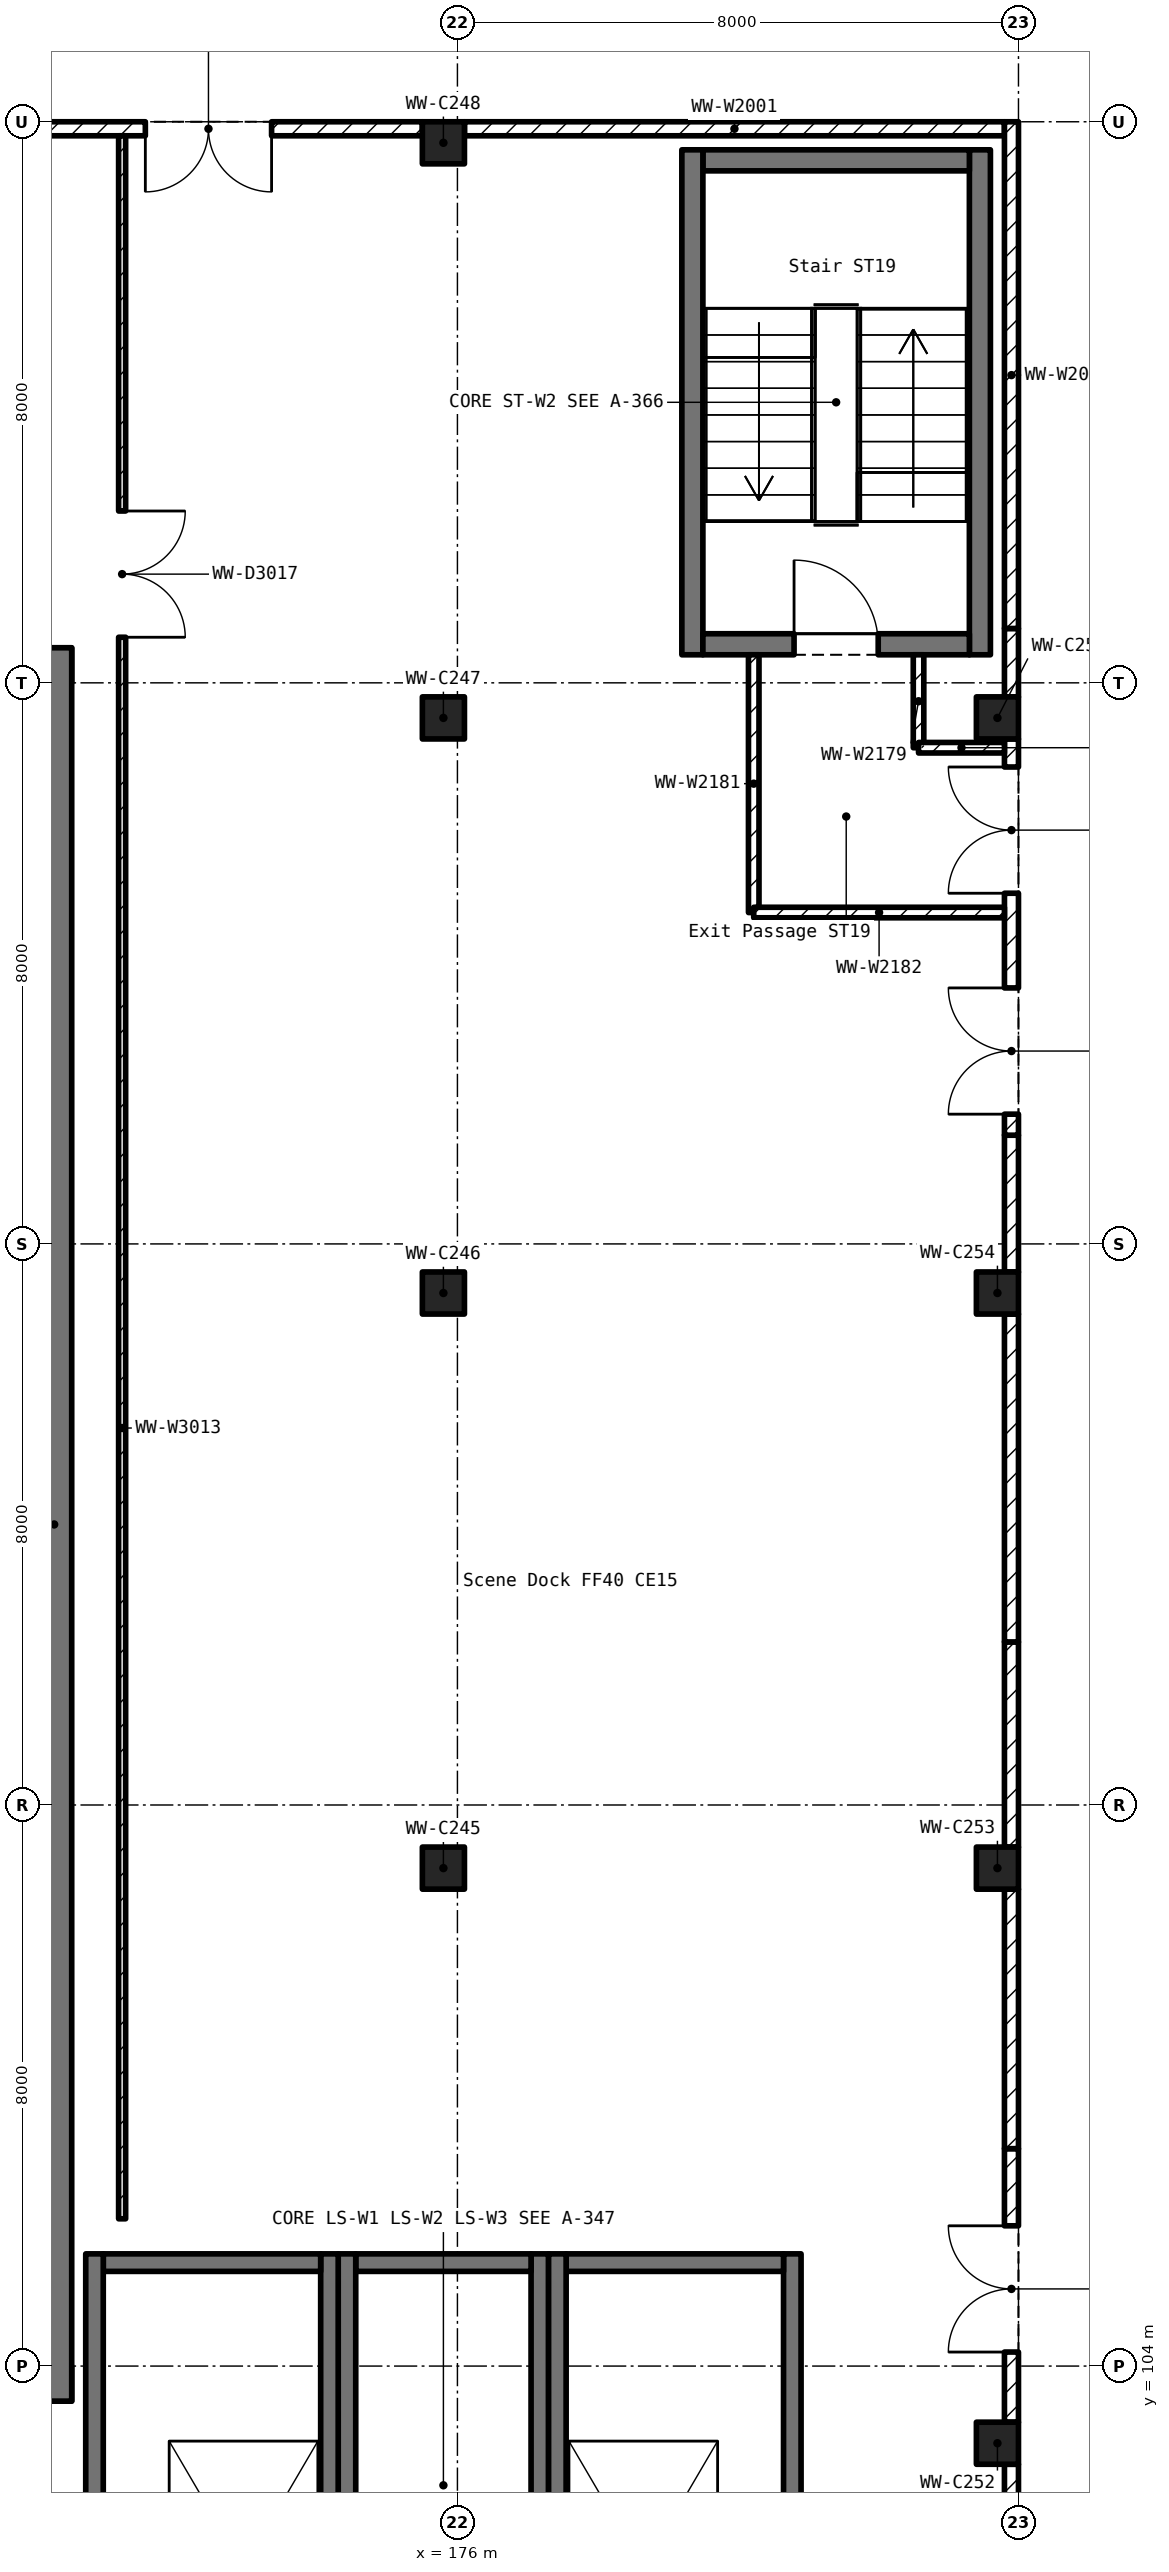
"""IFC4 building model, lengths in metres.
Left out: names, types, materials, properties, quantities, classifications, styles, units other than length and angle.
Written with IfcOpenShell. Run it as: python <this file> out.ifc"""

import sys

from ifc_helpers import new_model, si_unit, direction, frame, frame_2d, origin, origin_2d, place, context, subcontext, project, spatial, rectangle, extrude, element, fill, save


model = new_model("IFC4")
c1 = context("Model", 3, precision=1e-05, world=origin(), true_north=direction((0.0, 1.0)))
c2 = subcontext(c1, "Body", "Model", "MODEL_VIEW")
j1 = project(units=[si_unit("LENGTHUNIT", "METRE"), si_unit("PLANEANGLEUNIT", "RADIAN")], contexts=[c1])
p1 = place(None, origin())
s1 = spatial("IfcSite", under=j1, at=p1, CompositionType="ELEMENT")
p2 = place(p1, origin())
s2 = spatial("IfcBuilding", under=s1, at=p2, CompositionType="ELEMENT")
p3 = place(p2, origin())
s3 = spatial("IfcBuildingStorey", under=s2, at=p3, CompositionType="ELEMENT", Elevation=0.0)
for number, where, z_axis, x_axis in (
    (1, (175.8, 111.1, 0.0), (0.0, 0.0, 1.0), (1.0, 0.0, 0.0)),
    (2, (175.8, 119.3, 0.0), (0.0, 0.0, 1.0), (1.0, 0.0, 0.0)),
    (3, (175.8, 127.5, 0.0), (0.0, 0.0, 1.0), (1.0, 0.0, 0.0)),
    (4, (175.8, 135.7, 0.0), (0.0, 0.0, 1.0), (1.0, 0.0, 0.0)),
    (5, (183.7, 102.9, 0.0), (0.0, 0.0, 1.0), (1.0, 0.0, 0.0)),
    (6, (183.7, 111.1, 0.0), (0.0, 0.0, 1.0), (1.0, 0.0, 0.0)),
    (7, (183.7, 119.3, 0.0), (0.0, 0.0, 1.0), (1.0, 0.0, 0.0)),
    (8, (183.7, 127.5, 0.0), (0.0, 0.0, 1.0), (1.0, 0.0, 0.0)),
):
    element("IfcColumn", number, at=place(p3, frame(where, z_axis=z_axis, x_axis=x_axis)), inside=s3, PredefinedType="COLUMN", context=c2, shape_type="SweptSolid", body=[
        extrude(rectangle(XDim=0.6, YDim=0.6, at=origin_2d()), origin(), (0.0, 0.0, 1.0), 6.0),
    ])
p4 = place(p3, frame((143.5, 103.75, 0.0), z_axis=(0.0, 0.0, 1.0), x_axis=(1.0, 0.0, 0.0)))
e9 = element("IfcWall", 9, at=p4, inside=s3, PredefinedType="SHEAR", context=c2, shape_type="SweptSolid", body=[
    extrude(rectangle(XDim=27.0, YDim=0.5, at=frame_2d((13.5, 0.0))), origin(), (0.0, 0.0, 1.0), 6.0),
])
p5 = place(p3, frame((143.5, 128.25, 0.0), z_axis=(0.0, 0.0, 1.0), x_axis=(1.0, 0.0, 0.0)))
e10 = element("IfcWall", 10, at=p5, inside=s3, PredefinedType="SHEAR", context=c2, shape_type="SweptSolid", body=[
    extrude(rectangle(XDim=27.0, YDim=0.5, at=frame_2d((13.5, 0.0))), origin(), (0.0, 0.0, 1.0), 6.0),
])
p6 = place(p5, frame((14.0, 0.0, 0.0)))
e11 = element("IfcOpeningElement", 11, at=p6, cuts=e10, PredefinedType="OPENING", context=c2, shape_type="SweptSolid", body=[
    extrude(rectangle(XDim=1.8, YDim=2.1, at=frame_2d((0.9, 1.05))), frame((0.0, 0.262, 0.0), z_axis=(0.0, -1.0, 0.0), x_axis=(1.0, 0.0, 0.0)), (0.0, 0.0, 1.0), 0.524),
])
p7 = place(p5, frame((11.75, 0.0, 0.0)))
e12 = element("IfcOpeningElement", 12, at=p7, cuts=e10, PredefinedType="OPENING", context=c2, shape_type="SweptSolid", body=[
    extrude(rectangle(XDim=1.8, YDim=2.1, at=frame_2d((0.9, 1.05))), frame((0.0, 0.262, 0.0), z_axis=(0.0, -1.0, 0.0), x_axis=(1.0, 0.0, 0.0)), (0.0, 0.0, 1.0), 0.524),
])
p8 = place(p3, frame((170.25, 103.5, 0.0), z_axis=(0.0, 0.0, 1.0), x_axis=(0.0, 1.0, 0.0)))
e13 = element("IfcWall", 13, at=p8, inside=s3, PredefinedType="SHEAR", context=c2, shape_type="SweptSolid", body=[
    extrude(rectangle(XDim=25.0, YDim=0.5, at=frame_2d((12.5, 0.0))), origin(), (0.0, 0.0, 1.0), 6.0),
])
p9 = place(p3, frame((183.8, 135.9, 0.0), z_axis=(0.0, 0.0, 1.0), x_axis=(-1.0, 0.0, 0.0)))
e14 = element("IfcWall", 14, at=p9, inside=s3, PredefinedType="SOLIDWALL", context=c2, shape_type="SweptSolid", body=[
    extrude(rectangle(XDim=7.7, YDim=0.2, at=frame_2d((3.85, 0.0))), origin(), (0.0, 0.0, 1.0), 5.05),
])
p10 = place(p3, frame((175.5, 135.9, 0.0), z_axis=(0.0, 0.0, 1.0), x_axis=(-1.0, 0.0, 0.0)))
e15 = element("IfcWall", 15, at=p10, inside=s3, PredefinedType="SOLIDWALL", context=c2, shape_type="SweptSolid", body=[
    extrude(rectangle(XDim=7.3, YDim=0.2, at=frame_2d((3.65, 0.0))), origin(), (0.0, 0.0, 1.0), 5.05),
])
p11 = place(p10, frame((2.15, 0.0, 0.0)))
e16 = element("IfcOpeningElement", 16, at=p11, cuts=e15, PredefinedType="OPENING", context=c2, shape_type="SweptSolid", body=[
    extrude(rectangle(XDim=1.8, YDim=2.4, at=frame_2d((0.9, 1.2))), frame((0.0, 0.112, 0.0), z_axis=(0.0, -1.0, 0.0), x_axis=(1.0, 0.0, 0.0)), (0.0, 0.0, 1.0), 0.224),
])
p12 = place(p3, frame((183.9, 99.875, 0.0), z_axis=(0.0, 0.0, 1.0), x_axis=(0.0, 1.0, 0.0)))
e17 = element("IfcWall", 17, at=p12, inside=s3, PredefinedType="SOLIDWALL", context=c2, shape_type="SweptSolid", body=[
    extrude(rectangle(XDim=2.725, YDim=0.2, at=frame_2d((1.363, 0.0))), origin(), (0.0, 0.0, 1.0), 5.05),
])
p13 = place(p3, frame((183.9, 103.2, 0.0), z_axis=(0.0, 0.0, 1.0), x_axis=(0.0, 1.0, 0.0)))
e18 = element("IfcWall", 18, at=p13, inside=s3, PredefinedType="SOLIDWALL", context=c2, shape_type="SweptSolid", body=[
    extrude(rectangle(XDim=3.9, YDim=0.2, at=frame_2d((1.95, 0.0))), origin(), (0.0, 0.0, 1.0), 5.05),
])
p14 = place(p13, frame((1.0, 0.0, 0.0)))
e19 = element("IfcOpeningElement", 19, at=p14, cuts=e18, PredefinedType="OPENING", context=c2, shape_type="SweptSolid", body=[
    extrude(rectangle(XDim=1.8, YDim=2.4, at=frame_2d((0.9, 1.2))), frame((0.0, 0.112, 0.0), z_axis=(0.0, -1.0, 0.0), x_axis=(1.0, 0.0, 0.0)), (0.0, 0.0, 1.0), 0.224),
])
p15 = place(p3, frame((183.9, 107.1, 0.0), z_axis=(0.0, 0.0, 1.0), x_axis=(0.0, 1.0, 0.0)))
e20 = element("IfcWall", 20, at=p15, inside=s3, PredefinedType="SOLIDWALL", context=c2, shape_type="SweptSolid", body=[
    extrude(rectangle(XDim=3.7, YDim=0.2, at=frame_2d((1.85, 0.0))), origin(), (0.0, 0.0, 1.0), 5.05),
])
p16 = place(p3, frame((183.9, 111.4, 0.0), z_axis=(0.0, 0.0, 1.0), x_axis=(0.0, 1.0, 0.0)))
e21 = element("IfcWall", 21, at=p16, inside=s3, PredefinedType="SOLIDWALL", context=c2, shape_type="SweptSolid", body=[
    extrude(rectangle(XDim=2.925, YDim=0.2, at=frame_2d((1.462, 0.0))), origin(), (0.0, 0.0, 1.0), 5.05),
])
p17 = place(p3, frame((183.9, 114.325, 0.0), z_axis=(0.0, 0.0, 1.0), x_axis=(0.0, 1.0, 0.0)))
e22 = element("IfcWall", 22, at=p17, inside=s3, PredefinedType="SOLIDWALL", context=c2, shape_type="SweptSolid", body=[
    extrude(rectangle(XDim=4.675, YDim=0.2, at=frame_2d((2.337, 0.0))), origin(), (0.0, 0.0, 1.0), 5.05),
])
p18 = place(p3, frame((183.9, 119.6, 0.0), z_axis=(0.0, 0.0, 1.0), x_axis=(0.0, 1.0, 0.0)))
e23 = element("IfcWall", 23, at=p18, inside=s3, PredefinedType="SOLIDWALL", context=c2, shape_type="SweptSolid", body=[
    extrude(rectangle(XDim=1.95, YDim=0.2, at=frame_2d((0.975, 0.0))), origin(), (0.0, 0.0, 1.0), 5.05),
])
p19 = place(p3, frame((183.9, 121.55, 0.0), z_axis=(0.0, 0.0, 1.0), x_axis=(0.0, 1.0, 0.0)))
e24 = element("IfcWall", 24, at=p19, inside=s3, PredefinedType="SOLIDWALL", context=c2, shape_type="SweptSolid", body=[
    extrude(rectangle(XDim=5.65, YDim=0.2, at=frame_2d((2.825, 0.0))), origin(), (0.0, 0.0, 1.0), 5.05),
])
p20 = place(p19, frame((0.3, 0.0, 0.0)))
e25 = element("IfcOpeningElement", 25, at=p20, cuts=e24, PredefinedType="OPENING", context=c2, shape_type="SweptSolid", body=[
    extrude(rectangle(XDim=1.8, YDim=2.4, at=frame_2d((0.9, 1.2))), frame((0.0, 0.112, 0.0), z_axis=(0.0, -1.0, 0.0), x_axis=(1.0, 0.0, 0.0)), (0.0, 0.0, 1.0), 0.224),
])
p21 = place(p19, frame((3.45, 0.0, 0.0)))
e26 = element("IfcOpeningElement", 26, at=p21, cuts=e24, PredefinedType="OPENING", context=c2, shape_type="SweptSolid", body=[
    extrude(rectangle(XDim=1.8, YDim=2.4, at=frame_2d((0.9, 1.2))), frame((0.0, 0.112, 0.0), z_axis=(0.0, -1.0, 0.0), x_axis=(1.0, 0.0, 0.0)), (0.0, 0.0, 1.0), 0.224),
])
p22 = place(p3, frame((183.9, 127.8, 0.0), z_axis=(0.0, 0.0, 1.0), x_axis=(0.0, 1.0, 0.0)))
e27 = element("IfcWall", 27, at=p22, inside=s3, PredefinedType="SOLIDWALL", context=c2, shape_type="SweptSolid", body=[
    extrude(rectangle(XDim=0.975, YDim=0.2, at=frame_2d((0.487, 0.0))), origin(), (0.0, 0.0, 1.0), 5.05),
])
p23 = place(p3, frame((183.9, 128.775, 0.0), z_axis=(0.0, 0.0, 1.0), x_axis=(0.0, 1.0, 0.0)))
e28 = element("IfcWall", 28, at=p23, inside=s3, PredefinedType="SOLIDWALL", context=c2, shape_type="SweptSolid", body=[
    extrude(rectangle(XDim=7.225, YDim=0.2, at=frame_2d((3.613, 0.0))), origin(), (0.0, 0.0, 1.0), 5.05),
])
p24 = place(p3, frame((183.45, 128.4, 0.0), z_axis=(0.0, 0.0, 1.0), x_axis=(0.0, 1.0, 0.0)))
e29 = element("IfcWall", 29, at=p24, inside=s3, PredefinedType="SOLIDWALL", context=c2, shape_type="SweptSolid", body=[
    extrude(rectangle(XDim=7.2, YDim=0.3, at=frame_2d((3.6, 0.0))), origin(), (0.0, 0.0, 1.0), 6.0),
])
p25 = place(p3, frame((183.3, 135.45, 0.0), z_axis=(0.0, 0.0, 1.0), x_axis=(-1.0, 0.0, 0.0)))
e30 = element("IfcWall", 30, at=p25, inside=s3, PredefinedType="SOLIDWALL", context=c2, shape_type="SweptSolid", body=[
    extrude(rectangle(XDim=3.8, YDim=0.3, at=frame_2d((1.9, 0.0))), origin(), (0.0, 0.0, 1.0), 6.0),
])
p26 = place(p3, frame((179.35, 135.6, 0.0), z_axis=(0.0, 0.0, 1.0), x_axis=(0.0, -1.0, 0.0)))
e31 = element("IfcWall", 31, at=p26, inside=s3, PredefinedType="SOLIDWALL", context=c2, shape_type="SweptSolid", body=[
    extrude(rectangle(XDim=7.2, YDim=0.3, at=frame_2d((3.6, 0.0))), origin(), (0.0, 0.0, 1.0), 6.0),
])
p27 = place(p3, frame((179.5, 128.55, 0.0), z_axis=(0.0, 0.0, 1.0), x_axis=(1.0, 0.0, 0.0)))
e32 = element("IfcWall", 32, at=p27, inside=s3, PredefinedType="SOLIDWALL", context=c2, shape_type="SweptSolid", body=[
    extrude(rectangle(XDim=3.8, YDim=0.3, at=frame_2d((1.9, 0.0))), origin(), (0.0, 0.0, 1.0), 6.0),
])
p28 = place(p27, frame((1.3, 0.0, 0.0)))
e33 = element("IfcOpeningElement", 33, at=p28, cuts=e32, PredefinedType="OPENING", context=c2, shape_type="SweptSolid", body=[
    extrude(rectangle(XDim=1.2, YDim=2.1, at=frame_2d((0.6, 1.05))), frame((0.0, 0.162, 0.0), z_axis=(0.0, -1.0, 0.0), x_axis=(1.0, 0.0, 0.0)), (0.0, 0.0, 1.0), 0.324),
])
p29 = place(p3, frame((177.175, 99.0, 0.0), z_axis=(0.0, 0.0, 1.0), x_axis=(0.0, 1.0, 0.0)))
e34 = element("IfcWall", 34, at=p29, inside=s3, PredefinedType="SOLIDWALL", context=c2, shape_type="SweptSolid", body=[
    extrude(rectangle(XDim=6.6, YDim=0.25, at=frame_2d((3.3, 0.0))), origin(), (0.0, 0.0, 1.0), 6.0),
])
p30 = place(p3, frame((177.05, 105.475, 0.0), z_axis=(0.0, 0.0, 1.0), x_axis=(-1.0, 0.0, 0.0)))
e35 = element("IfcWall", 35, at=p30, inside=s3, PredefinedType="SOLIDWALL", context=c2, shape_type="SweptSolid", body=[
    extrude(rectangle(XDim=2.5, YDim=0.25, at=frame_2d((1.25, 0.0))), origin(), (0.0, 0.0, 1.0), 6.0),
])
for number, where, z_axis, x_axis in (
    (36, (174.425, 105.6, 0.0), (0.0, 0.0, 1.0), (0.0, -1.0, 0.0)),
    (37, (174.175, 99.0, 0.0), (0.0, 0.0, 1.0), (0.0, 1.0, 0.0)),
):
    element("IfcWall", number, at=place(p3, frame(where, z_axis=z_axis, x_axis=x_axis)), inside=s3, PredefinedType="SOLIDWALL", context=c2, shape_type="SweptSolid", body=[
        extrude(rectangle(XDim=6.6, YDim=0.25, at=frame_2d((3.3, 0.0))), origin(), (0.0, 0.0, 1.0), 6.0),
    ])
p31 = place(p3, frame((174.05, 105.475, 0.0), z_axis=(0.0, 0.0, 1.0), x_axis=(-1.0, 0.0, 0.0)))
e38 = element("IfcWall", 38, at=p31, inside=s3, PredefinedType="SOLIDWALL", context=c2, shape_type="SweptSolid", body=[
    extrude(rectangle(XDim=3.1, YDim=0.25, at=frame_2d((1.55, 0.0))), origin(), (0.0, 0.0, 1.0), 6.0),
])
for number, where, z_axis, x_axis in (
    (39, (170.825, 105.6, 0.0), (0.0, 0.0, 1.0), (0.0, -1.0, 0.0)),
    (40, (180.775, 99.0, 0.0), (0.0, 0.0, 1.0), (0.0, 1.0, 0.0)),
):
    element("IfcWall", number, at=place(p3, frame(where, z_axis=z_axis, x_axis=x_axis)), inside=s3, PredefinedType="SOLIDWALL", context=c2, shape_type="SweptSolid", body=[
        extrude(rectangle(XDim=6.6, YDim=0.25, at=frame_2d((3.3, 0.0))), origin(), (0.0, 0.0, 1.0), 6.0),
    ])
p32 = place(p3, frame((180.65, 105.475, 0.0), z_axis=(0.0, 0.0, 1.0), x_axis=(-1.0, 0.0, 0.0)))
e41 = element("IfcWall", 41, at=p32, inside=s3, PredefinedType="SOLIDWALL", context=c2, shape_type="SweptSolid", body=[
    extrude(rectangle(XDim=3.1, YDim=0.25, at=frame_2d((1.55, 0.0))), origin(), (0.0, 0.0, 1.0), 6.0),
])
p33 = place(p3, frame((177.425, 105.6, 0.0), z_axis=(0.0, 0.0, 1.0), x_axis=(0.0, -1.0, 0.0)))
e42 = element("IfcWall", 42, at=p33, inside=s3, PredefinedType="SOLIDWALL", context=c2, shape_type="SweptSolid", body=[
    extrude(rectangle(XDim=6.6, YDim=0.25, at=frame_2d((3.3, 0.0))), origin(), (0.0, 0.0, 1.0), 6.0),
])
p34 = place(p3, frame((171.219, 135.8, 0.0), z_axis=(0.0, 0.0, 1.0), x_axis=(0.0, -1.0, 0.0)))
e43 = element("IfcWall", 43, at=p34, inside=s3, PredefinedType="PARTITIONING", context=c2, shape_type="SweptSolid", body=[
    extrude(rectangle(XDim=29.7, YDim=0.1, at=frame_2d((14.85, 0.0))), origin(), (0.0, 0.0, 1.0), 4.95),
])
p35 = place(p34, frame((5.35, 0.0, 0.0)))
e44 = element("IfcOpeningElement", 44, at=p35, cuts=e43, PredefinedType="OPENING", context=c2, shape_type="SweptSolid", body=[
    extrude(rectangle(XDim=1.8, YDim=2.1, at=frame_2d((0.9, 1.05))), frame((0.0, 0.062, 0.0), z_axis=(0.0, -1.0, 0.0), x_axis=(1.0, 0.0, 0.0)), (0.0, 0.0, 1.0), 0.124),
])
p36 = place(p3, frame((182.575, 128.4, 0.0), z_axis=(0.0, 0.0, 1.0), x_axis=(0.0, -1.0, 0.0)))
e45 = element("IfcWall", 45, at=p36, inside=s3, PredefinedType="PARTITIONING", context=c2, shape_type="SweptSolid", body=[
    extrude(rectangle(XDim=1.325, YDim=0.15, at=frame_2d((0.663, 0.0))), origin(), (0.0, 0.0, 1.0), 5.05),
])
p37 = place(p3, frame((182.575, 127.075, 0.0), z_axis=(0.0, 0.0, 1.0), x_axis=(1.0, 0.0, 0.0)))
e46 = element("IfcWall", 46, at=p37, inside=s3, PredefinedType="PARTITIONING", context=c2, shape_type="SweptSolid", body=[
    extrude(rectangle(XDim=1.225, YDim=0.15, at=frame_2d((0.613, 0.0))), origin(), (0.0, 0.0, 1.0), 5.05),
])
p38 = place(p3, frame((180.225, 128.4, 0.0), z_axis=(0.0, 0.0, 1.0), x_axis=(0.0, -1.0, 0.0)))
e47 = element("IfcWall", 47, at=p38, inside=s3, PredefinedType="PARTITIONING", context=c2, shape_type="SweptSolid", body=[
    extrude(rectangle(XDim=3.675, YDim=0.15, at=frame_2d((1.837, 0.0))), origin(), (0.0, 0.0, 1.0), 5.05),
])
p39 = place(p3, frame((180.225, 124.725, 0.0), z_axis=(0.0, 0.0, 1.0), x_axis=(1.0, 0.0, 0.0)))
e48 = element("IfcWall", 48, at=p39, inside=s3, PredefinedType="PARTITIONING", context=c2, shape_type="SweptSolid", body=[
    extrude(rectangle(XDim=3.575, YDim=0.15, at=frame_2d((1.788, 0.0))), origin(), (0.0, 0.0, 1.0), 5.05),
])
p40 = place(p20, origin())
e49 = element("IfcDoor", 49, at=p40, inside=s3, OperationType="DOUBLE_DOOR_DOUBLE_SWING", PredefinedType="DOOR", context=c2, shape_type="SweptSolid", body=[
    extrude(rectangle(XDim=1.8, YDim=2.4, at=frame_2d((0.9, 1.2))), frame((0.0, 0.025, 0.0), z_axis=(0.0, -1.0, 0.0), x_axis=(1.0, 0.0, 0.0)), (0.0, 0.0, 1.0), 0.05),
])
fill(e25, e49)
p41 = place(p28, origin())
e50 = element("IfcDoor", 50, at=p41, inside=s3, OperationType="SINGLE_SWING_LEFT", PredefinedType="DOOR", context=c2, shape_type="SweptSolid", body=[
    extrude(rectangle(XDim=1.2, YDim=2.1, at=frame_2d((0.6, 1.05))), frame((0.0, 0.025, 0.0), z_axis=(0.0, -1.0, 0.0), x_axis=(1.0, 0.0, 0.0)), (0.0, 0.0, 1.0), 0.05),
])
fill(e33, e50)
p42 = place(p35, origin())
e51 = element("IfcDoor", 51, at=p42, inside=s3, OperationType="DOUBLE_DOOR_SINGLE_SWING", PredefinedType="DOOR", context=c2, shape_type="SweptSolid", body=[
    extrude(rectangle(XDim=1.8, YDim=2.1, at=frame_2d((0.9, 1.05))), frame((0.0, 0.025, 0.0), z_axis=(0.0, -1.0, 0.0), x_axis=(1.0, 0.0, 0.0)), (0.0, 0.0, 1.0), 0.05),
])
fill(e44, e51)
p43 = place(p11, origin())
e52 = element("IfcDoor", 52, at=p43, inside=s3, OperationType="DOUBLE_DOOR_DOUBLE_SWING", PredefinedType="DOOR", context=c2, shape_type="SweptSolid", body=[
    extrude(rectangle(XDim=1.8, YDim=2.4, at=frame_2d((0.9, 1.2))), frame((0.0, 0.025, 0.0), z_axis=(0.0, -1.0, 0.0), x_axis=(1.0, 0.0, 0.0)), (0.0, 0.0, 1.0), 0.05),
])
fill(e16, e52)
p44 = place(p14, origin())
e53 = element("IfcDoor", 53, at=p44, inside=s3, OperationType="DOUBLE_DOOR_DOUBLE_SWING", PredefinedType="DOOR", context=c2, shape_type="SweptSolid", body=[
    extrude(rectangle(XDim=1.8, YDim=2.4, at=frame_2d((0.9, 1.2))), frame((0.0, 0.025, 0.0), z_axis=(0.0, -1.0, 0.0), x_axis=(1.0, 0.0, 0.0)), (0.0, 0.0, 1.0), 0.05),
])
fill(e19, e53)
p45 = place(p21, origin())
e54 = element("IfcDoor", 54, at=p45, inside=s3, OperationType="DOUBLE_DOOR_DOUBLE_SWING", PredefinedType="DOOR", context=c2, shape_type="SweptSolid", body=[
    extrude(rectangle(XDim=1.8, YDim=2.4, at=frame_2d((0.9, 1.2))), frame((0.0, 0.025, 0.0), z_axis=(0.0, -1.0, 0.0), x_axis=(1.0, 0.0, 0.0)), (0.0, 0.0, 1.0), 0.05),
])
fill(e26, e54)
save(model, sys.argv[1])
